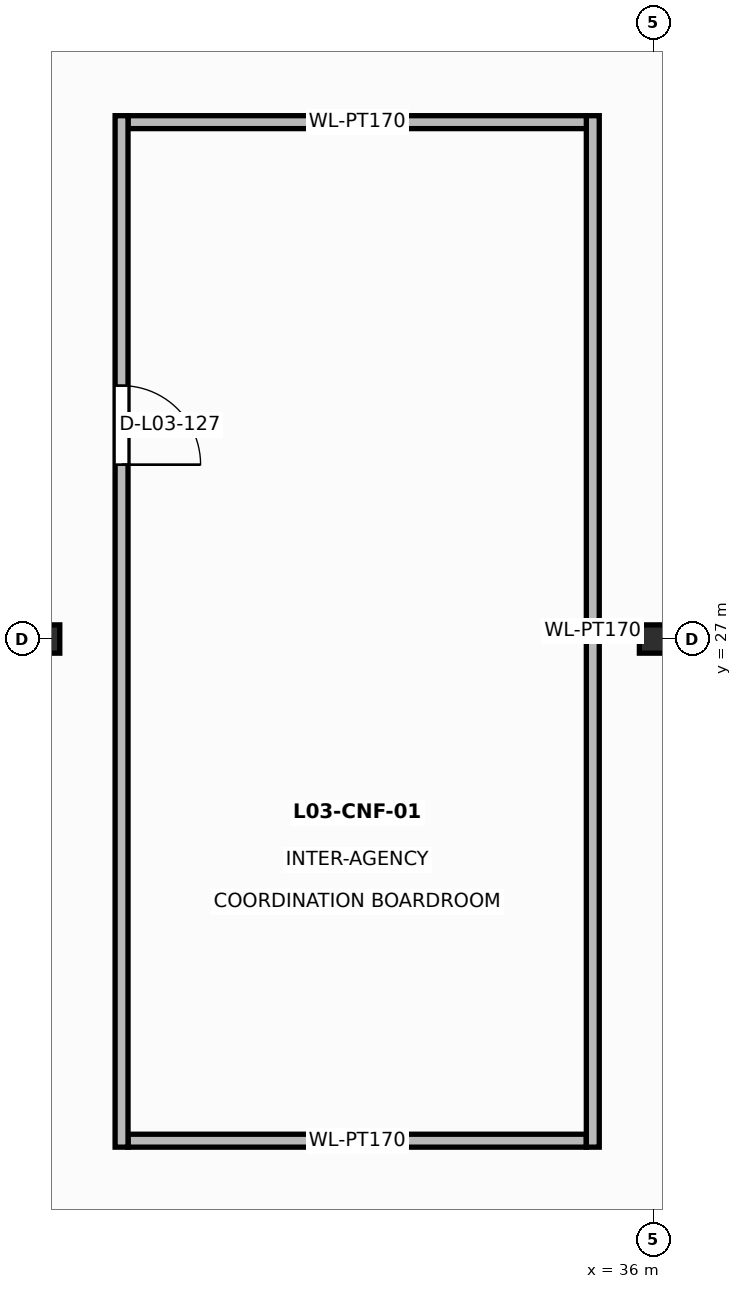
"""IFC4 building model, lengths in metres.
Left out: names, types, materials, properties, quantities, classifications, styles, units other than length and angle.
Written with IfcOpenShell. Run it as: python <this file> out.ifc"""

import sys

from ifc_helpers import new_model, si_unit, direction, frame, frame_2d, origin, origin_2d, place, context, subcontext, project, spatial, rectangle, i_section, extrude, element, fill, save


model = new_model("IFC4")
c1 = context("Model", 3, precision=1e-05, world=origin(), true_north=direction((0.0, 1.0)))
c2 = subcontext(c1, "Body", "Model", "MODEL_VIEW")
j1 = project(units=[si_unit("LENGTHUNIT", "METRE"), si_unit("PLANEANGLEUNIT", "RADIAN")], contexts=[c1])
p1 = place(None, origin())
s1 = spatial("IfcSite", under=j1, at=p1, CompositionType="ELEMENT")
p2 = place(p1, origin())
s2 = spatial("IfcBuilding", under=s1, at=p2, CompositionType="ELEMENT")
p3 = place(p2, frame((0.0, 0.0, 15.6)))
s3 = spatial("IfcBuildingStorey", under=s2, at=p3, CompositionType="ELEMENT", Elevation=15.6)
for number, where, z_axis, x_axis in (
    (1, (28.0, 27.0, 0.0), (0.0, 0.0, 1.0), (1.0, 0.0, 0.0)),
    (2, (36.0, 27.0, 0.0), (0.0, 0.0, 1.0), (1.0, 0.0, 0.0)),
):
    element("IfcColumn", number, at=place(p3, frame(where, z_axis=z_axis, x_axis=x_axis)), inside=s3, PredefinedType="COLUMN", context=c2, shape_type="SweptSolid", body=[
        extrude(i_section(OverallWidth=0.374, OverallDepth=0.372, WebThickness=0.016, FlangeThickness=0.026, at=origin_2d()), origin(), (0.0, 0.0, 1.0), 4.2),
    ])
p4 = place(p3, frame((29.085, 20.4, 0.0), z_axis=(0.0, 0.0, 1.0), x_axis=(1.0, 0.0, 0.0)))
e3 = element("IfcWall", 3, at=p4, inside=s3, PredefinedType="PARTITIONING", context=c2, shape_type="SweptSolid", body=[
    extrude(rectangle(XDim=6.03, YDim=0.17, at=frame_2d((3.015, 0.0))), origin(), (0.0, 0.0, 1.0), 3.9),
])
p5 = place(p3, frame((35.2, 20.315, 0.0), z_axis=(0.0, 0.0, 1.0), x_axis=(0.0, 1.0, 0.0)))
e4 = element("IfcWall", 4, at=p5, inside=s3, PredefinedType="PARTITIONING", context=c2, shape_type="SweptSolid", body=[
    extrude(rectangle(XDim=13.57, YDim=0.17, at=frame_2d((6.785, 0.0))), origin(), (0.0, 0.0, 1.0), 3.196),
])
p6 = place(p3, frame((35.115, 33.8, 0.0), z_axis=(0.0, 0.0, 1.0), x_axis=(-1.0, 0.0, 0.0)))
e5 = element("IfcWall", 5, at=p6, inside=s3, PredefinedType="PARTITIONING", context=c2, shape_type="SweptSolid", body=[
    extrude(rectangle(XDim=6.03, YDim=0.17, at=frame_2d((3.015, 0.0))), origin(), (0.0, 0.0, 1.0), 3.9),
])
p7 = place(p3, frame((29.0, 33.885, 0.0), z_axis=(0.0, 0.0, 1.0), x_axis=(0.0, -1.0, 0.0)))
e6 = element("IfcWall", 6, at=p7, inside=s3, PredefinedType="PARTITIONING", context=c2, shape_type="SweptSolid", body=[
    extrude(rectangle(XDim=13.57, YDim=0.17, at=frame_2d((6.785, 0.0))), origin(), (0.0, 0.0, 1.0), 3.196),
])
p8 = place(p7, frame((3.551, 0.0, 0.0)))
e7 = element("IfcOpeningElement", 7, at=p8, cuts=e6, PredefinedType="OPENING", context=c2, shape_type="SweptSolid", body=[
    extrude(rectangle(XDim=1.04, YDim=2.16, at=frame_2d((0.52, 1.08))), frame((0.0, 0.095, 0.0), z_axis=(0.0, -1.0, 0.0), x_axis=(1.0, 0.0, 0.0)), (0.0, 0.0, 1.0), 0.19),
])
p9 = place(p8, origin())
e8 = element("IfcDoor", 8, at=p9, inside=s3, OperationType="SINGLE_SWING_RIGHT", PredefinedType="DOOR", context=c2, shape_type="SweptSolid", body=[
    extrude(rectangle(XDim=1.04, YDim=2.16, at=frame_2d((0.52, 1.08))), frame((0.0, 0.025, 0.0), z_axis=(0.0, -1.0, 0.0), x_axis=(1.0, 0.0, 0.0)), (0.0, 0.0, 1.0), 0.05),
])
fill(e7, e8)
save(model, sys.argv[1])
